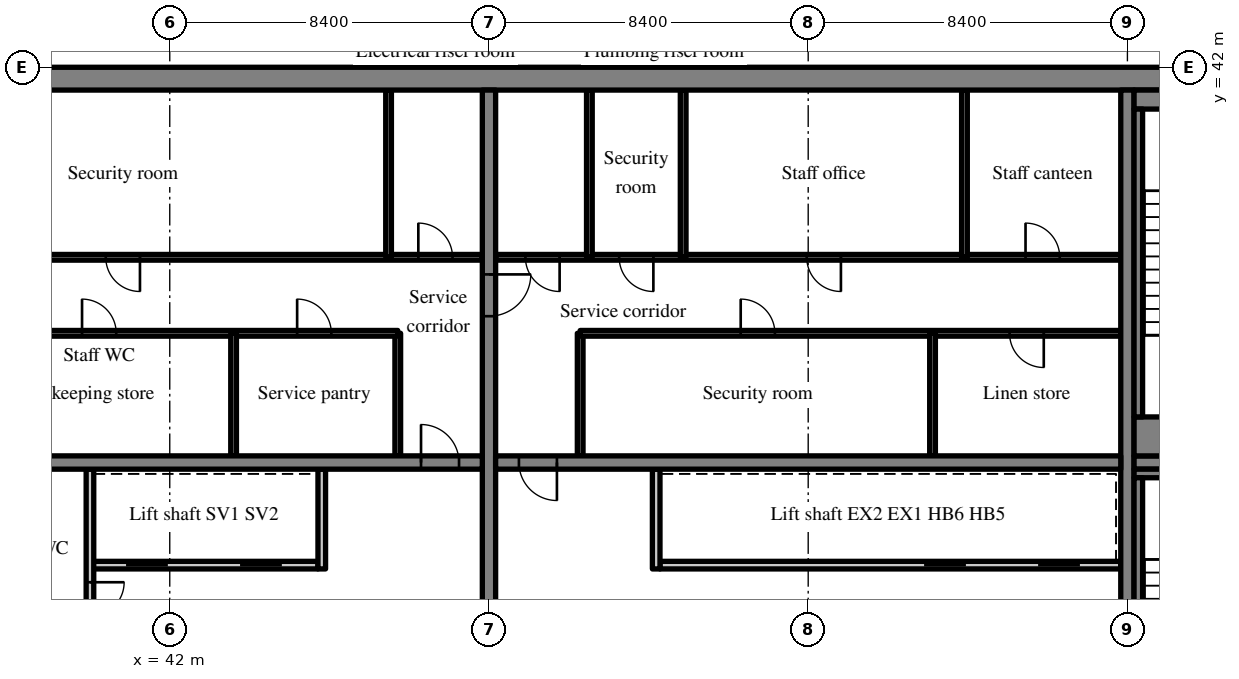
"""IFC4 building model, lengths in metres.
Left out: names, types, materials, properties, quantities, classifications, styles, units other than length and angle.
Written with IfcOpenShell. Run it as: python <this file> out.ifc"""

import sys

from ifc_helpers import new_model, si_unit, direction, frame, frame_2d, origin, place, context, subcontext, project, spatial, rectangle, extrude, source, transform, mapped, element, fill, save


model = new_model("IFC4")
c1 = context("Model", 3, precision=1e-05, world=origin(), true_north=direction((0.0, 1.0)))
c2 = subcontext(c1, "Body", "Model", "MODEL_VIEW")
j1 = project(units=[si_unit("LENGTHUNIT", "METRE"), si_unit("PLANEANGLEUNIT", "RADIAN")], contexts=[c1])
p1 = place(None, origin())
s1 = spatial("IfcSite", under=j1, at=p1, CompositionType="ELEMENT")
p2 = place(p1, origin())
s2 = spatial("IfcBuilding", under=s1, at=p2, CompositionType="ELEMENT")
p3 = place(p2, frame((0.0, 0.0, 245.2)))
s3 = spatial("IfcBuildingStorey", under=s2, at=p3, CompositionType="ELEMENT", Elevation=245.2)
m1 = source(origin(), c2, "Body", "SweptSolid", [
    extrude(rectangle(XDim=50.4, YDim=0.6, at=frame_2d((25.2, 0.0))), origin(), (0.0, 0.0, 1.0), 3.62),
])
p4 = place(p3, frame((25.2, 41.7, 0.0), z_axis=(0.0, 0.0, 1.0), x_axis=(1.0, 0.0, 0.0)))
e1 = element("IfcWall", 1, at=p4, inside=s3, PredefinedType="SHEAR", context=c2, shape_type="MappedRepresentation", body=[
    mapped(m1, transform((0.0, 0.0, 0.0), scale=1.0)),
])
m2 = source(origin(), c2, "Body", "SweptSolid", [
    extrude(rectangle(XDim=18.8, YDim=0.35, at=frame_2d((9.4, 0.0))), origin(), (0.0, 0.0, 1.0), 3.62),
])
p5 = place(p3, frame((50.4, 22.6, 0.0), z_axis=(0.0, 0.0, 1.0), x_axis=(0.0, 1.0, 0.0)))
e2 = element("IfcWall", 2, at=p5, inside=s3, PredefinedType="SHEAR", context=c2, shape_type="MappedRepresentation", body=[
    mapped(m2, transform((0.0, 0.0, 0.0), scale=1.0)),
])
m3 = source(origin(), c2, "Body", "SweptSolid", [
    extrude(rectangle(XDim=1.1, YDim=2.1, at=frame_2d((0.55, 1.05))), frame((0.0, 0.185, 0.0), z_axis=(0.0, -1.0, 0.0), x_axis=(1.0, 0.0, 0.0)), (0.0, 0.0, 1.0), 0.37),
])
p6 = place(p5, frame((12.85, 0.0, 0.0)))
e3 = element("IfcOpeningElement", 3, at=p6, cuts=e2, PredefinedType="OPENING", context=c2, shape_type="MappedRepresentation", body=[
    mapped(m3, transform((0.0, 0.0, 0.0), scale=1.0)),
])
p7 = place(p3, frame((67.2, 22.6, 0.0), z_axis=(0.0, 0.0, 1.0), x_axis=(0.0, 1.0, 0.0)))
e4 = element("IfcWall", 4, at=p7, inside=s3, PredefinedType="SHEAR", context=c2, shape_type="MappedRepresentation", body=[
    mapped(m2, transform((0.0, 0.0, 0.0), scale=1.0)),
])
m4 = source(origin(), c2, "Body", "SweptSolid", [
    extrude(rectangle(XDim=16.45, YDim=0.35, at=frame_2d((8.225, 0.0))), origin(), (0.0, 0.0, 1.0), 3.62),
])
p8 = place(p3, frame((33.775, 31.6, 0.0), z_axis=(0.0, 0.0, 1.0), x_axis=(1.0, 0.0, 0.0)))
e5 = element("IfcWall", 5, at=p8, inside=s3, PredefinedType="SHEAR", context=c2, shape_type="MappedRepresentation", body=[
    mapped(m4, transform((0.0, 0.0, 0.0), scale=1.0)),
])
m5 = source(origin(), c2, "Body", "SweptSolid", [
    extrude(rectangle(XDim=1.0, YDim=2.1, at=frame_2d((0.5, 1.05))), frame((0.0, 0.185, 0.0), z_axis=(0.0, -1.0, 0.0), x_axis=(1.0, 0.0, 0.0)), (0.0, 0.0, 1.0), 0.37),
])
p9 = place(p8, frame((14.837, 0.0, 0.0)))
e6 = element("IfcOpeningElement", 6, at=p9, cuts=e5, PredefinedType="OPENING", context=c2, shape_type="MappedRepresentation", body=[
    mapped(m5, transform((0.0, 0.0, 0.0), scale=1.0)),
])
m6 = source(origin(), c2, "Body", "SweptSolid", [
    extrude(rectangle(XDim=16.45, YDim=0.35, at=frame_2d((8.225, 0.0))), origin(), (0.0, 0.0, 1.0), 3.62),
])
p10 = place(p3, frame((50.575, 31.6, 0.0), z_axis=(0.0, 0.0, 1.0), x_axis=(1.0, 0.0, 0.0)))
e7 = element("IfcWall", 7, at=p10, inside=s3, PredefinedType="SHEAR", context=c2, shape_type="MappedRepresentation", body=[
    mapped(m6, transform((0.0, 0.0, 0.0), scale=1.0)),
])
p11 = place(p10, frame((0.613, 0.0, 0.0)))
e8 = element("IfcOpeningElement", 8, at=p11, cuts=e7, PredefinedType="OPENING", context=c2, shape_type="MappedRepresentation", body=[
    mapped(m5, transform((0.0, 0.0, 0.0), scale=1.0)),
])
m7 = source(origin(), c2, "Body", "SweptSolid", [
    extrude(rectangle(XDim=7.625, YDim=0.35, at=frame_2d((3.812, 0.0))), origin(), (0.0, 0.0, 1.0), 3.62),
])
p12 = place(p3, frame((67.375, 31.6, 0.0), z_axis=(0.0, 0.0, 1.0), x_axis=(1.0, 0.0, 0.0)))
e9 = element("IfcWall", 9, at=p12, inside=s3, PredefinedType="SHEAR", context=c2, shape_type="MappedRepresentation", body=[
    mapped(m7, transform((0.0, 0.0, 0.0), scale=1.0)),
])
p13 = place(p12, frame((5.8, 0.0, 0.0)))
e10 = element("IfcOpeningElement", 10, at=p13, cuts=e9, PredefinedType="OPENING", context=c2, shape_type="MappedRepresentation", body=[
    mapped(m3, transform((0.0, 0.0, 0.0), scale=1.0)),
])
m8 = source(origin(), c2, "Body", "SweptSolid", [
    extrude(rectangle(XDim=6.0, YDim=0.2, at=frame_2d((3.0, 0.0))), origin(), (0.0, 0.0, 1.0), 3.62),
])
p14 = place(p3, frame((39.9, 28.9, 0.0), z_axis=(0.0, 0.0, 1.0), x_axis=(1.0, 0.0, 0.0)))
e11 = element("IfcWall", 11, at=p14, inside=s3, PredefinedType="SOLIDWALL", context=c2, shape_type="MappedRepresentation", body=[
    mapped(m8, transform((0.0, 0.0, 0.0), scale=1.0)),
])
m9 = source(origin(), c2, "Body", "SweptSolid", [
    extrude(rectangle(XDim=1.1, YDim=2.1, at=frame_2d((0.55, 1.05))), frame((0.0, 0.11, 0.0), z_axis=(0.0, -1.0, 0.0), x_axis=(1.0, 0.0, 0.0)), (0.0, 0.0, 1.0), 0.22),
])
p15 = place(p14, frame((0.95, 0.0, 0.0)))
e12 = element("IfcOpeningElement", 12, at=p15, cuts=e11, PredefinedType="OPENING", context=c2, shape_type="MappedRepresentation", body=[
    mapped(m9, transform((0.0, 0.0, 0.0), scale=1.0)),
])
p16 = place(p14, frame((3.95, 0.0, 0.0)))
e13 = element("IfcOpeningElement", 13, at=p16, cuts=e11, PredefinedType="OPENING", context=c2, shape_type="MappedRepresentation", body=[
    mapped(m9, transform((0.0, 0.0, 0.0), scale=1.0)),
])
m10 = source(origin(), c2, "Body", "SweptSolid", [
    extrude(rectangle(XDim=8.825, YDim=0.2, at=frame_2d((4.413, 0.0))), origin(), (0.0, 0.0, 1.0), 3.62),
])
p17 = place(p3, frame((39.9, 22.6, 0.0), z_axis=(0.0, 0.0, 1.0), x_axis=(0.0, 1.0, 0.0)))
e14 = element("IfcWall", 14, at=p17, inside=s3, PredefinedType="PARTITIONING", context=c2, shape_type="MappedRepresentation", body=[
    mapped(m10, transform((0.0, 0.0, 0.0), scale=1.0)),
])
m11 = source(origin(), c2, "Body", "SweptSolid", [
    extrude(rectangle(XDim=0.9, YDim=2.1, at=frame_2d((0.45, 1.05))), frame((0.0, 0.11, 0.0), z_axis=(0.0, -1.0, 0.0), x_axis=(1.0, 0.0, 0.0)), (0.0, 0.0, 1.0), 0.22),
])
p18 = place(p17, frame((3.15, 0.0, 0.0)))
e15 = element("IfcOpeningElement", 15, at=p18, cuts=e14, PredefinedType="OPENING", context=c2, shape_type="MappedRepresentation", body=[
    mapped(m11, transform((0.0, 0.0, 0.0), scale=1.0)),
])
p19 = place(p17, frame((4.95, 0.0, 0.0)))
e16 = element("IfcOpeningElement", 16, at=p19, cuts=e14, PredefinedType="OPENING", context=c2, shape_type="MappedRepresentation", body=[
    mapped(m11, transform((0.0, 0.0, 0.0), scale=1.0)),
])
m12 = source(origin(), c2, "Body", "SweptSolid", [
    extrude(rectangle(XDim=2.625, YDim=0.2, at=frame_2d((1.312, 0.0))), origin(), (0.0, 0.0, 1.0), 3.62),
])
p20 = place(p3, frame((46.0, 28.8, 0.0), z_axis=(0.0, 0.0, 1.0), x_axis=(0.0, 1.0, 0.0)))
e17 = element("IfcWall", 17, at=p20, inside=s3, PredefinedType="SOLIDWALL", context=c2, shape_type="MappedRepresentation", body=[
    mapped(m12, transform((0.0, 0.0, 0.0), scale=1.0)),
])
m13 = source(origin(), c2, "Body", "SweptSolid", [
    extrude(rectangle(XDim=3.225, YDim=0.15, at=frame_2d((1.613, 0.0))), origin(), (0.0, 0.0, 1.0), 3.62),
])
p21 = place(p3, frame((48.0, 31.775, 0.0), z_axis=(0.0, 0.0, 1.0), x_axis=(0.0, 1.0, 0.0)))
e18 = element("IfcWall", 18, at=p21, inside=s3, PredefinedType="PARTITIONING", context=c2, shape_type="MappedRepresentation", body=[
    mapped(m13, transform((0.0, 0.0, 0.0), scale=1.0)),
])
m14 = source(origin(), c2, "Body", "SweptSolid", [
    extrude(rectangle(XDim=14.225, YDim=0.15, at=frame_2d((7.113, 0.0))), origin(), (0.0, 0.0, 1.0), 3.62),
])
p22 = place(p3, frame((33.775, 35.0, 0.0), z_axis=(0.0, 0.0, 1.0), x_axis=(1.0, 0.0, 0.0)))
e19 = element("IfcWall", 19, at=p22, inside=s3, PredefinedType="PARTITIONING", context=c2, shape_type="MappedRepresentation", body=[
    mapped(m14, transform((0.0, 0.0, 0.0), scale=1.0)),
])
m15 = source(origin(), c2, "Body", "SweptSolid", [
    extrude(rectangle(XDim=0.9, YDim=2.1, at=frame_2d((0.45, 1.05))), frame((0.0, 0.085, 0.0), z_axis=(0.0, -1.0, 0.0), x_axis=(1.0, 0.0, 0.0)), (0.0, 0.0, 1.0), 0.17),
])
p23 = place(p22, frame((0.965, 0.0, 0.0)))
e20 = element("IfcOpeningElement", 20, at=p23, cuts=e19, PredefinedType="OPENING", context=c2, shape_type="MappedRepresentation", body=[
    mapped(m15, transform((0.0, 0.0, 0.0), scale=1.0)),
])
p24 = place(p22, frame((5.917, 0.0, 0.0)))
e21 = element("IfcOpeningElement", 21, at=p24, cuts=e19, PredefinedType="OPENING", context=c2, shape_type="MappedRepresentation", body=[
    mapped(m15, transform((0.0, 0.0, 0.0), scale=1.0)),
])
p25 = place(p22, frame((11.577, 0.0, 0.0)))
e22 = element("IfcOpeningElement", 22, at=p25, cuts=e19, PredefinedType="OPENING", context=c2, shape_type="MappedRepresentation", body=[
    mapped(m15, transform((0.0, 0.0, 0.0), scale=1.0)),
])
m16 = source(origin(), c2, "Body", "SweptSolid", [
    extrude(rectangle(XDim=16.45, YDim=0.15, at=frame_2d((8.225, 0.0))), origin(), (0.0, 0.0, 1.0), 3.62),
])
p26 = place(p3, frame((33.775, 37.0, 0.0), z_axis=(0.0, 0.0, 1.0), x_axis=(1.0, 0.0, 0.0)))
e23 = element("IfcWall", 23, at=p26, inside=s3, PredefinedType="PARTITIONING", context=c2, shape_type="MappedRepresentation", body=[
    mapped(m16, transform((0.0, 0.0, 0.0), scale=1.0)),
])
p27 = place(p26, frame((6.541, 0.0, 0.0)))
e24 = element("IfcOpeningElement", 24, at=p27, cuts=e23, PredefinedType="OPENING", context=c2, shape_type="MappedRepresentation", body=[
    mapped(m15, transform((0.0, 0.0, 0.0), scale=1.0)),
])
p28 = place(p26, frame((14.766, 0.0, 0.0)))
e25 = element("IfcOpeningElement", 25, at=p28, cuts=e23, PredefinedType="OPENING", context=c2, shape_type="MappedRepresentation", body=[
    mapped(m15, transform((0.0, 0.0, 0.0), scale=1.0)),
])
p29 = place(p3, frame((43.68, 31.775, 0.0), z_axis=(0.0, 0.0, 1.0), x_axis=(0.0, 1.0, 0.0)))
e26 = element("IfcWall", 26, at=p29, inside=s3, PredefinedType="PARTITIONING", context=c2, shape_type="MappedRepresentation", body=[
    mapped(m13, transform((0.0, 0.0, 0.0), scale=1.0)),
])
m17 = source(origin(), c2, "Body", "SweptSolid", [
    extrude(rectangle(XDim=4.4, YDim=0.15, at=frame_2d((2.2, 0.0))), origin(), (0.0, 0.0, 1.0), 3.62),
])
p30 = place(p3, frame((47.758, 37.0, 0.0), z_axis=(0.0, 0.0, 1.0), x_axis=(0.0, 1.0, 0.0)))
e27 = element("IfcWall", 27, at=p30, inside=s3, PredefinedType="PARTITIONING", context=c2, shape_type="MappedRepresentation", body=[
    mapped(m17, transform((0.0, 0.0, 0.0), scale=1.0)),
])
m18 = source(origin(), c2, "Body", "SweptSolid", [
    extrude(rectangle(XDim=12.125, YDim=0.2, at=frame_2d((6.062, 0.0))), origin(), (0.0, 0.0, 1.0), 3.62),
])
p31 = place(p3, frame((67.025, 28.9, 0.0), z_axis=(0.0, 0.0, 1.0), x_axis=(-1.0, 0.0, 0.0)))
e28 = element("IfcWall", 28, at=p31, inside=s3, PredefinedType="SOLIDWALL", context=c2, shape_type="MappedRepresentation", body=[
    mapped(m18, transform((0.0, 0.0, 0.0), scale=1.0)),
])
p32 = place(p31, frame((1.075, 0.0, 0.0)))
e29 = element("IfcOpeningElement", 29, at=p32, cuts=e28, PredefinedType="OPENING", context=c2, shape_type="MappedRepresentation", body=[
    mapped(m9, transform((0.0, 0.0, 0.0), scale=1.0)),
])
p33 = place(p31, frame((4.075, 0.0, 0.0)))
e30 = element("IfcOpeningElement", 30, at=p33, cuts=e28, PredefinedType="OPENING", context=c2, shape_type="MappedRepresentation", body=[
    mapped(m9, transform((0.0, 0.0, 0.0), scale=1.0)),
])
p34 = place(p3, frame((54.8, 28.8, 0.0), z_axis=(0.0, 0.0, 1.0), x_axis=(0.0, 1.0, 0.0)))
e31 = element("IfcWall", 31, at=p34, inside=s3, PredefinedType="SOLIDWALL", context=c2, shape_type="MappedRepresentation", body=[
    mapped(m12, transform((0.0, 0.0, 0.0), scale=1.0)),
])
p35 = place(p3, frame((52.8, 31.775, 0.0), z_axis=(0.0, 0.0, 1.0), x_axis=(0.0, 1.0, 0.0)))
e32 = element("IfcWall", 32, at=p35, inside=s3, PredefinedType="PARTITIONING", context=c2, shape_type="MappedRepresentation", body=[
    mapped(m13, transform((0.0, 0.0, 0.0), scale=1.0)),
])
m19 = source(origin(), c2, "Body", "SweptSolid", [
    extrude(rectangle(XDim=14.225, YDim=0.15, at=frame_2d((7.112, 0.0))), origin(), (0.0, 0.0, 1.0), 3.62),
])
p36 = place(p3, frame((67.025, 35.0, 0.0), z_axis=(0.0, 0.0, 1.0), x_axis=(-1.0, 0.0, 0.0)))
e33 = element("IfcWall", 33, at=p36, inside=s3, PredefinedType="PARTITIONING", context=c2, shape_type="MappedRepresentation", body=[
    mapped(m19, transform((0.0, 0.0, 0.0), scale=1.0)),
])
p37 = place(p36, frame((2.026, 0.0, 0.0)))
e34 = element("IfcOpeningElement", 34, at=p37, cuts=e33, PredefinedType="OPENING", context=c2, shape_type="MappedRepresentation", body=[
    mapped(m15, transform((0.0, 0.0, 0.0), scale=1.0)),
])
p38 = place(p36, frame((9.101, 0.0, 0.0)))
e35 = element("IfcOpeningElement", 35, at=p38, cuts=e33, PredefinedType="OPENING", context=c2, shape_type="MappedRepresentation", body=[
    mapped(m15, transform((0.0, 0.0, 0.0), scale=1.0)),
])
m20 = source(origin(), c2, "Body", "SweptSolid", [
    extrude(rectangle(XDim=16.45, YDim=0.15, at=frame_2d((8.225, 0.0))), origin(), (0.0, 0.0, 1.0), 3.62),
])
p39 = place(p3, frame((67.025, 37.0, 0.0), z_axis=(0.0, 0.0, 1.0), x_axis=(-1.0, 0.0, 0.0)))
e36 = element("IfcWall", 36, at=p39, inside=s3, PredefinedType="PARTITIONING", context=c2, shape_type="MappedRepresentation", body=[
    mapped(m20, transform((0.0, 0.0, 0.0), scale=1.0)),
])
p40 = place(p39, frame((1.606, 0.0, 0.0)))
e37 = element("IfcOpeningElement", 37, at=p40, cuts=e36, PredefinedType="OPENING", context=c2, shape_type="MappedRepresentation", body=[
    mapped(m15, transform((0.0, 0.0, 0.0), scale=1.0)),
])
p41 = place(p39, frame((7.364, 0.0, 0.0)))
e38 = element("IfcOpeningElement", 38, at=p41, cuts=e36, PredefinedType="OPENING", context=c2, shape_type="MappedRepresentation", body=[
    mapped(m15, transform((0.0, 0.0, 0.0), scale=1.0)),
])
p42 = place(p39, frame((12.299, 0.0, 0.0)))
e39 = element("IfcOpeningElement", 39, at=p42, cuts=e36, PredefinedType="OPENING", context=c2, shape_type="MappedRepresentation", body=[
    mapped(m15, transform((0.0, 0.0, 0.0), scale=1.0)),
])
p43 = place(p39, frame((14.766, 0.0, 0.0)))
e40 = element("IfcOpeningElement", 40, at=p43, cuts=e36, PredefinedType="OPENING", context=c2, shape_type="MappedRepresentation", body=[
    mapped(m15, transform((0.0, 0.0, 0.0), scale=1.0)),
])
p44 = place(p3, frame((62.072, 31.775, 0.0), z_axis=(0.0, 0.0, 1.0), x_axis=(0.0, 1.0, 0.0)))
e41 = element("IfcWall", 41, at=p44, inside=s3, PredefinedType="PARTITIONING", context=c2, shape_type="MappedRepresentation", body=[
    mapped(m13, transform((0.0, 0.0, 0.0), scale=1.0)),
])
for number, where, z_axis, x_axis in (
    (42, (62.912, 37.0, 0.0), (0.0, 0.0, 1.0), (0.0, 1.0, 0.0)),
    (43, (55.51, 37.0, 0.0), (0.0, 0.0, 1.0), (0.0, 1.0, 0.0)),
    (44, (53.042, 37.0, 0.0), (0.0, 0.0, 1.0), (0.0, 1.0, 0.0)),
):
    element("IfcWall", number, at=place(p3, frame(where, z_axis=z_axis, x_axis=x_axis)), inside=s3, PredefinedType="PARTITIONING", context=c2, shape_type="MappedRepresentation", body=[
        mapped(m17, transform((0.0, 0.0, 0.0), scale=1.0)),
    ])
m21 = source(origin(), c2, "Body", "SweptSolid", [
    extrude(rectangle(XDim=4.875, YDim=0.225, at=frame_2d((2.438, 0.0))), origin(), (0.0, 0.0, 1.0), 3.62),
])
p45 = place(p3, frame((67.375, 31.312, 0.0), z_axis=(0.0, 0.0, 1.0), x_axis=(1.0, 0.0, 0.0)))
e45 = element("IfcWall", 45, at=p45, inside=s3, PredefinedType="SOLIDWALL", context=c2, shape_type="MappedRepresentation", body=[
    mapped(m21, transform((0.0, 0.0, 0.0), scale=1.0)),
])
m22 = source(origin(), c2, "Body", "SweptSolid", [
    extrude(rectangle(XDim=8.1, YDim=0.225, at=frame_2d((4.05, 0.0))), origin(), (0.0, 0.0, 1.0), 3.62),
])
p46 = place(p3, frame((67.487, 23.1, 0.0), z_axis=(0.0, 0.0, 1.0), x_axis=(0.0, 1.0, 0.0)))
e46 = element("IfcWall", 46, at=p46, inside=s3, PredefinedType="SOLIDWALL", context=c2, shape_type="MappedRepresentation", body=[
    mapped(m22, transform((0.0, 0.0, 0.0), scale=1.0)),
])
m23 = source(origin(), c2, "Body", "SweptSolid", [
    extrude(rectangle(XDim=4.875, YDim=0.5, at=frame_2d((2.438, 0.0))), origin(), (0.0, 0.0, 1.0), 3.62),
])
p47 = place(p3, frame((67.375, 41.15, 0.0), z_axis=(0.0, 0.0, 1.0), x_axis=(1.0, 0.0, 0.0)))
e47 = element("IfcWall", 47, at=p47, inside=s3, PredefinedType="SOLIDWALL", context=c2, shape_type="MappedRepresentation", body=[
    mapped(m23, transform((0.0, 0.0, 0.0), scale=1.0)),
])
m24 = source(origin(), c2, "Body", "SweptSolid", [
    extrude(rectangle(XDim=4.875, YDim=1.025, at=frame_2d((2.438, 0.0))), origin(), (0.0, 0.0, 1.0), 3.62),
])
p48 = place(p3, frame((67.375, 32.287, 0.0), z_axis=(0.0, 0.0, 1.0), x_axis=(1.0, 0.0, 0.0)))
e48 = element("IfcWall", 48, at=p48, inside=s3, PredefinedType="SOLIDWALL", context=c2, shape_type="MappedRepresentation", body=[
    mapped(m24, transform((0.0, 0.0, 0.0), scale=1.0)),
])
p49 = place(p3, frame((67.487, 32.8, 0.0), z_axis=(0.0, 0.0, 1.0), x_axis=(0.0, 1.0, 0.0)))
e49 = element("IfcWall", 49, at=p49, inside=s3, PredefinedType="SOLIDWALL", context=c2, shape_type="MappedRepresentation", body=[
    mapped(m22, transform((0.0, 0.0, 0.0), scale=1.0)),
])
m25 = source(origin(), c2, "Body", "SweptSolid", [
    extrude(rectangle(XDim=1.0, YDim=2.1, at=frame_2d((0.5, 1.05))), frame((0.0, 0.025, 0.0), z_axis=(0.0, -1.0, 0.0), x_axis=(1.0, 0.0, 0.0)), (0.0, 0.0, 1.0), 0.05),
])
p50 = place(p9, origin())
e50 = element("IfcDoor", 50, at=p50, inside=s3, OperationType="SINGLE_SWING_LEFT", PredefinedType="DOOR", context=c2, shape_type="MappedRepresentation", body=[
    mapped(m25, transform((0.0, 0.0, 0.0), scale=1.0)),
])
fill(e6, e50)
m26 = source(origin(), c2, "Body", "SweptSolid", [
    extrude(rectangle(XDim=1.1, YDim=2.1, at=frame_2d((0.55, 1.05))), frame((0.0, 0.025, 0.0), z_axis=(0.0, -1.0, 0.0), x_axis=(1.0, 0.0, 0.0)), (0.0, 0.0, 1.0), 0.05),
])
p51 = place(p15, origin())
e51 = element("IfcDoor", 51, at=p51, inside=s3, OperationType="SLIDING_TO_LEFT", PredefinedType="DOOR", context=c2, shape_type="MappedRepresentation", body=[
    mapped(m26, transform((0.0, 0.0, 0.0), scale=1.0)),
])
fill(e12, e51)
p52 = place(p16, origin())
e52 = element("IfcDoor", 52, at=p52, inside=s3, OperationType="SLIDING_TO_RIGHT", PredefinedType="DOOR", context=c2, shape_type="MappedRepresentation", body=[
    mapped(m26, transform((0.0, 0.0, 0.0), scale=1.0)),
])
fill(e13, e52)
m27 = source(origin(), c2, "Body", "SweptSolid", [
    extrude(rectangle(XDim=0.9, YDim=2.1, at=frame_2d((0.45, 1.05))), frame((0.0, 0.025, 0.0), z_axis=(0.0, -1.0, 0.0), x_axis=(1.0, 0.0, 0.0)), (0.0, 0.0, 1.0), 0.05),
])
p53 = place(p19, origin())
e53 = element("IfcDoor", 53, at=p53, inside=s3, OperationType="SINGLE_SWING_RIGHT", PredefinedType="DOOR", context=c2, shape_type="MappedRepresentation", body=[
    mapped(m27, transform((0.0, 0.0, 0.0), scale=1.0)),
])
fill(e16, e53)
p54 = place(p24, origin())
e54 = element("IfcDoor", 54, at=p54, inside=s3, OperationType="SINGLE_SWING_LEFT", PredefinedType="DOOR", context=c2, shape_type="MappedRepresentation", body=[
    mapped(m27, transform((0.0, 0.0, 0.0), scale=1.0)),
])
fill(e21, e54)
p55 = place(p25, origin())
e55 = element("IfcDoor", 55, at=p55, inside=s3, OperationType="SINGLE_SWING_LEFT", PredefinedType="DOOR", context=c2, shape_type="MappedRepresentation", body=[
    mapped(m27, transform((0.0, 0.0, 0.0), scale=1.0)),
])
fill(e22, e55)
p56 = place(p27, origin())
e56 = element("IfcDoor", 56, at=p56, inside=s3, OperationType="SINGLE_SWING_RIGHT", PredefinedType="DOOR", context=c2, shape_type="MappedRepresentation", body=[
    mapped(m27, transform((0.0, 0.0, 0.0), scale=1.0)),
])
fill(e24, e56)
p57 = place(p28, origin())
e57 = element("IfcDoor", 57, at=p57, inside=s3, OperationType="SINGLE_SWING_LEFT", PredefinedType="DOOR", context=c2, shape_type="MappedRepresentation", body=[
    mapped(m27, transform((0.0, 0.0, 0.0), scale=1.0)),
])
fill(e25, e57)
p58 = place(p11, origin())
e58 = element("IfcDoor", 58, at=p58, inside=s3, OperationType="SINGLE_SWING_RIGHT", PredefinedType="DOOR", context=c2, shape_type="MappedRepresentation", body=[
    mapped(m25, transform((0.0, 0.0, 0.0), scale=1.0)),
])
fill(e8, e58)
p59 = place(p32, origin())
e59 = element("IfcDoor", 59, at=p59, inside=s3, OperationType="SLIDING_TO_RIGHT", PredefinedType="DOOR", context=c2, shape_type="MappedRepresentation", body=[
    mapped(m26, transform((0.0, 0.0, 0.0), scale=1.0)),
])
fill(e29, e59)
p60 = place(p33, origin())
e60 = element("IfcDoor", 60, at=p60, inside=s3, OperationType="SLIDING_TO_LEFT", PredefinedType="DOOR", context=c2, shape_type="MappedRepresentation", body=[
    mapped(m26, transform((0.0, 0.0, 0.0), scale=1.0)),
])
fill(e30, e60)
p61 = place(p37, origin())
e61 = element("IfcDoor", 61, at=p61, inside=s3, OperationType="SINGLE_SWING_LEFT", PredefinedType="DOOR", context=c2, shape_type="MappedRepresentation", body=[
    mapped(m27, transform((0.0, 0.0, 0.0), scale=1.0)),
])
fill(e34, e61)
p62 = place(p38, origin())
e62 = element("IfcDoor", 62, at=p62, inside=s3, OperationType="SINGLE_SWING_RIGHT", PredefinedType="DOOR", context=c2, shape_type="MappedRepresentation", body=[
    mapped(m27, transform((0.0, 0.0, 0.0), scale=1.0)),
])
fill(e35, e62)
p63 = place(p40, origin())
e63 = element("IfcDoor", 63, at=p63, inside=s3, OperationType="SINGLE_SWING_RIGHT", PredefinedType="DOOR", context=c2, shape_type="MappedRepresentation", body=[
    mapped(m27, transform((0.0, 0.0, 0.0), scale=1.0)),
])
fill(e37, e63)
p64 = place(p41, origin())
e64 = element("IfcDoor", 64, at=p64, inside=s3, OperationType="SINGLE_SWING_LEFT", PredefinedType="DOOR", context=c2, shape_type="MappedRepresentation", body=[
    mapped(m27, transform((0.0, 0.0, 0.0), scale=1.0)),
])
fill(e38, e64)
p65 = place(p42, origin())
e65 = element("IfcDoor", 65, at=p65, inside=s3, OperationType="SINGLE_SWING_LEFT", PredefinedType="DOOR", context=c2, shape_type="MappedRepresentation", body=[
    mapped(m27, transform((0.0, 0.0, 0.0), scale=1.0)),
])
fill(e39, e65)
p66 = place(p43, origin())
e66 = element("IfcDoor", 66, at=p66, inside=s3, OperationType="SINGLE_SWING_LEFT", PredefinedType="DOOR", context=c2, shape_type="MappedRepresentation", body=[
    mapped(m27, transform((0.0, 0.0, 0.0), scale=1.0)),
])
fill(e40, e66)
p67 = place(p6, origin())
e67 = element("IfcDoor", 67, at=p67, inside=s3, OperationType="SINGLE_SWING_RIGHT", PredefinedType="DOOR", context=c2, shape_type="MappedRepresentation", body=[
    mapped(m26, transform((0.0, 0.0, 0.0), scale=1.0)),
])
fill(e3, e67)
save(model, sys.argv[1])
